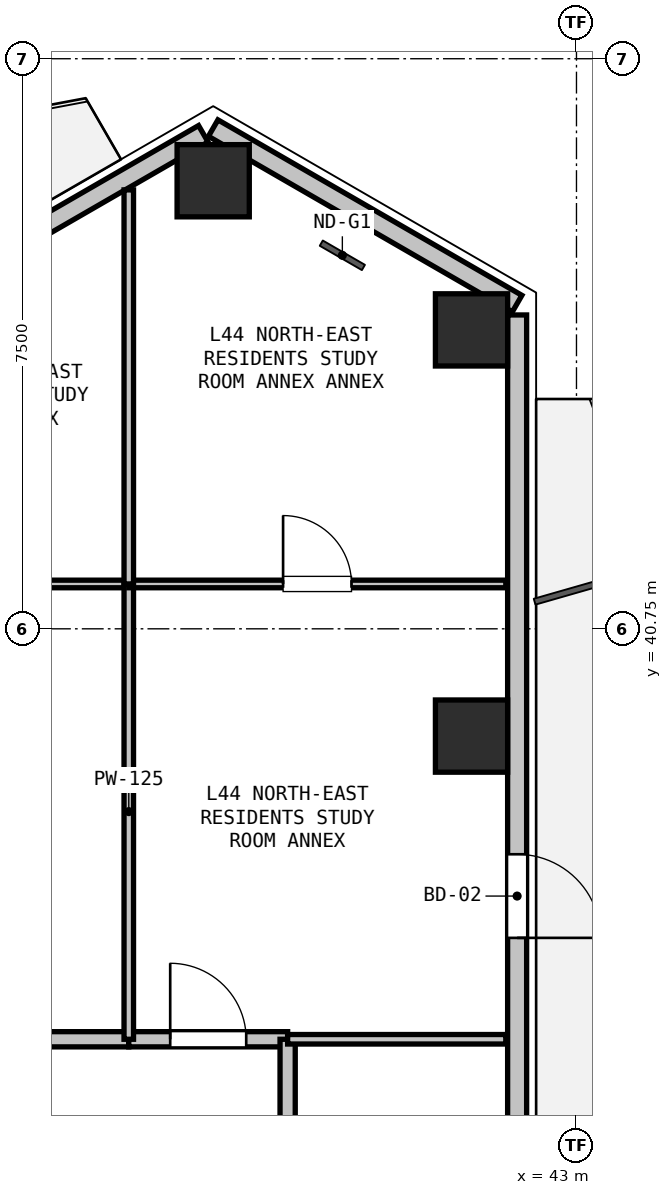
"""IFC4 building model, lengths in metres.
Left out: names, types, materials, properties, quantities, classifications, styles, units other than length and angle.
Written with IfcOpenShell. Run it as: python <this file> out.ifc"""

import sys

from ifc_helpers import new_model, si_unit, direction, frame, frame_2d, origin, origin_2d, place, context, subcontext, project, spatial, rectangle, hollow_rectangle, extrude, element, fill, save


model = new_model("IFC4")
c1 = context("Model", 3, precision=1e-05, world=origin(), true_north=direction((0.0, 1.0)))
c2 = subcontext(c1, "Body", "Model", "MODEL_VIEW")
j1 = project(units=[si_unit("LENGTHUNIT", "METRE"), si_unit("PLANEANGLEUNIT", "RADIAN")], contexts=[c1])
p1 = place(None, origin())
s1 = spatial("IfcSite", under=j1, at=p1, CompositionType="ELEMENT")
p2 = place(p1, origin())
s2 = spatial("IfcBuilding", under=s1, at=p2, CompositionType="ELEMENT")
p3 = place(p2, frame((0.0, 0.0, 157.5)))
s3 = spatial("IfcBuildingStorey", under=s2, at=p3, CompositionType="ELEMENT", Elevation=157.5)
for number, where, z_axis, x_axis in (
    (1, (38.22, 46.645, 0.0), (0.0, 0.0, 1.0), (1.0, 0.0, 0.0)),
    (2, (41.619, 44.683, 0.0), (0.0, 0.0, 1.0), (1.0, 0.0, 0.0)),
    (3, (41.619, 39.339, 0.0), (0.0, 0.0, 1.0), (1.0, 0.0, 0.0)),
):
    element("IfcColumn", number, at=place(p3, frame(where, z_axis=z_axis, x_axis=x_axis)), inside=s3, PredefinedType="COLUMN", context=c2, shape_type="SweptSolid", body=[
        extrude(hollow_rectangle(XDim=0.95, YDim=0.95, WallThickness=0.028, at=origin_2d()), origin(), (0.0, 0.0, 1.0), 3.3),
    ])
p4 = place(p3, frame((38.22, 47.338, 0.0), z_axis=(0.0, 0.0, 1.0), x_axis=(0.866035021055, -0.499983342029, 0.0)))
e4 = element("IfcWall", 4, at=p4, inside=s3, PredefinedType="SOLIDWALL", context=c2, shape_type="SweptSolid", body=[
    extrude(rectangle(XDim=4.617, YDim=0.25, at=frame_2d((2.309, 0.0))), origin(), (0.0, 0.0, 1.0), 2.6),
])
p5 = place(p3, frame((28.403, 41.67, 0.0), z_axis=(0.0, 0.0, 1.0), x_axis=(0.86602239209, 0.500005216371, 0.0)))
e5 = element("IfcWall", 5, at=p5, inside=s3, PredefinedType="SOLIDWALL", context=c2, shape_type="SweptSolid", body=[
    extrude(rectangle(XDim=11.186, YDim=0.25, at=frame_2d((5.593, 0.0))), origin(), (0.0, 0.0, 1.0), 2.6),
])
p6 = place(p5, frame((1.416, 0.0, 0.9)))
e6 = element("IfcOpeningElement", 6, at=p6, cuts=e5, PredefinedType="OPENING", context=c2, shape_type="SweptSolid", body=[
    extrude(rectangle(XDim=1.2, YDim=1.4, at=frame_2d((0.6, 0.7))), frame((0.0, 0.135, 0.0), z_axis=(0.0, -1.0, 0.0), x_axis=(1.0, 0.0, 0.0)), (0.0, 0.0, 1.0), 0.27),
])
p7 = place(p3, frame((42.219, 44.879, 0.0), z_axis=(0.0, 0.0, 1.0), x_axis=(0.0, -1.0, 0.0)))
e7 = element("IfcWall", 7, at=p7, inside=s3, PredefinedType="SOLIDWALL", context=c2, shape_type="SweptSolid", body=[
    extrude(rectangle(XDim=11.186, YDim=0.25, at=frame_2d((5.593, 0.0))), origin(), (0.0, 0.0, 1.0), 2.6),
])
p8 = place(p7, frame((7.095, 0.0, 0.0)))
e8 = element("IfcOpeningElement", 8, at=p8, cuts=e7, PredefinedType="OPENING", context=c2, shape_type="SweptSolid", body=[
    extrude(rectangle(XDim=1.1, YDim=2.1, at=frame_2d((0.55, 1.05))), frame((0.0, 0.135, 0.0), z_axis=(0.0, -1.0, 0.0), x_axis=(1.0, 0.0, 0.0)), (0.0, 0.0, 1.0), 0.27),
])
p9 = place(p3, frame((32.0, 35.35, 0.0), z_axis=(0.0, 0.0, 1.0), x_axis=(1.0, 0.0, 0.0)))
e9 = element("IfcWall", 9, at=p9, inside=s3, PredefinedType="PARTITIONING", context=c2, shape_type="SweptSolid", body=[
    extrude(rectangle(XDim=5.11, YDim=0.2, at=frame_2d((2.555, 0.0))), origin(), (0.0, 0.0, 1.0), 2.428),
])
p10 = place(p9, frame((2.055, 0.0, 0.0)))
e10 = element("IfcOpeningElement", 10, at=p10, cuts=e9, PredefinedType="OPENING", context=c2, shape_type="SweptSolid", body=[
    extrude(rectangle(XDim=1.0, YDim=2.15, at=frame_2d((0.5, 1.075))), frame((0.0, 0.11, 0.0), z_axis=(0.0, -1.0, 0.0), x_axis=(1.0, 0.0, 0.0)), (0.0, 0.0, 1.0), 0.22),
])
p11 = place(p3, frame((37.11, 35.35, 0.0), z_axis=(0.0, 0.0, 1.0), x_axis=(1.0, 0.0, 0.0)))
e11 = element("IfcWall", 11, at=p11, inside=s3, PredefinedType="PARTITIONING", context=c2, shape_type="SweptSolid", body=[
    extrude(rectangle(XDim=2.09, YDim=0.2, at=frame_2d((1.045, 0.0))), origin(), (0.0, 0.0, 1.0), 2.428),
])
p12 = place(p11, frame((0.545, 0.0, 0.0)))
e12 = element("IfcOpeningElement", 12, at=p12, cuts=e11, PredefinedType="OPENING", context=c2, shape_type="SweptSolid", body=[
    extrude(rectangle(XDim=1.0, YDim=2.15, at=frame_2d((0.5, 1.075))), frame((0.0, 0.11, 0.0), z_axis=(0.0, -1.0, 0.0), x_axis=(1.0, 0.0, 0.0)), (0.0, 0.0, 1.0), 0.22),
])
p13 = place(p3, frame((39.2, 35.35, 0.0), z_axis=(0.0, 0.0, 1.0), x_axis=(0.0, -1.0, 0.0)))
e13 = element("IfcWall", 13, at=p13, inside=s3, PredefinedType="PARTITIONING", context=c2, shape_type="SweptSolid", body=[
    extrude(rectangle(XDim=1.75, YDim=0.2, at=frame_2d((0.875, 0.0))), origin(), (0.0, 0.0, 1.0), 2.98),
])
p14 = place(p3, frame((32.0, 41.34, 0.0), z_axis=(0.0, 0.0, 1.0), x_axis=(1.0, 0.0, 0.0)))
e14 = element("IfcWall", 14, at=p14, inside=s3, PredefinedType="PARTITIONING", context=c2, shape_type="SweptSolid", body=[
    extrude(rectangle(XDim=5.11, YDim=0.1, at=frame_2d((2.555, 0.0))), origin(), (0.0, 0.0, 1.0), 2.98),
])
p15 = place(p14, frame((2.105, 0.0, 0.0)))
e15 = element("IfcOpeningElement", 15, at=p15, cuts=e14, PredefinedType="OPENING", context=c2, shape_type="SweptSolid", body=[
    extrude(rectangle(XDim=0.9, YDim=2.1, at=frame_2d((0.45, 1.05))), frame((0.0, 0.06, 0.0), z_axis=(0.0, -1.0, 0.0), x_axis=(1.0, 0.0, 0.0)), (0.0, 0.0, 1.0), 0.12),
])
p16 = place(p3, frame((37.11, 41.34, 0.0), z_axis=(0.0, 0.0, 1.0), x_axis=(0.0, -1.0, 0.0)))
e16 = element("IfcWall", 16, at=p16, inside=s3, PredefinedType="PARTITIONING", context=c2, shape_type="SweptSolid", body=[
    extrude(rectangle(XDim=5.99, YDim=0.125, at=frame_2d((2.995, 0.0))), origin(), (0.0, 0.0, 1.0), 2.428),
])
p17 = place(p3, frame((37.11, 41.34, 0.0), z_axis=(0.0, 0.0, 1.0), x_axis=(1.0, 0.0, 0.0)))
e17 = element("IfcWall", 17, at=p17, inside=s3, PredefinedType="PARTITIONING", context=c2, shape_type="SweptSolid", body=[
    extrude(rectangle(XDim=4.96, YDim=0.1, at=frame_2d((2.48, 0.0))), origin(), (0.0, 0.0, 1.0), 2.428),
])
p18 = place(p17, frame((2.03, 0.0, 0.0)))
e18 = element("IfcOpeningElement", 18, at=p18, cuts=e17, PredefinedType="OPENING", context=c2, shape_type="SweptSolid", body=[
    extrude(rectangle(XDim=0.9, YDim=2.1, at=frame_2d((0.45, 1.05))), frame((0.0, 0.06, 0.0), z_axis=(0.0, -1.0, 0.0), x_axis=(1.0, 0.0, 0.0)), (0.0, 0.0, 1.0), 0.12),
])
p19 = place(p3, frame((42.07, 35.35, 0.0), z_axis=(0.0, 0.0, 1.0), x_axis=(-1.0, 0.0, 0.0)))
e19 = element("IfcWall", 19, at=p19, inside=s3, PredefinedType="PARTITIONING", context=c2, shape_type="SweptSolid", body=[
    extrude(rectangle(XDim=2.87, YDim=0.125, at=frame_2d((1.435, 0.0))), origin(), (0.0, 0.0, 1.0), 2.365),
])
p20 = place(p3, frame((37.11, 46.524, 0.0), z_axis=(0.0, 0.0, 1.0), x_axis=(0.0, -1.0, 0.0)))
e20 = element("IfcWall", 20, at=p20, inside=s3, PredefinedType="PARTITIONING", context=c2, shape_type="SweptSolid", body=[
    extrude(rectangle(XDim=5.184, YDim=0.125, at=frame_2d((2.592, 0.0))), origin(), (0.0, 0.0, 1.0), 2.645),
])
p21 = place(p8, origin())
e21 = element("IfcDoor", 21, at=p21, inside=s3, OperationType="SINGLE_SWING_RIGHT", PredefinedType="DOOR", context=c2, shape_type="SweptSolid", body=[
    extrude(rectangle(XDim=1.1, YDim=2.1, at=frame_2d((0.55, 1.05))), frame((0.0, 0.025, 0.0), z_axis=(0.0, -1.0, 0.0), x_axis=(1.0, 0.0, 0.0)), (0.0, 0.0, 1.0), 0.05),
])
fill(e8, e21)
p22 = place(p12, origin())
e22 = element("IfcDoor", 22, at=p22, inside=s3, OperationType="SINGLE_SWING_LEFT", PredefinedType="DOOR", context=c2, shape_type="SweptSolid", body=[
    extrude(rectangle(XDim=1.0, YDim=2.15, at=frame_2d((0.5, 1.075))), frame((0.0, 0.025, 0.0), z_axis=(0.0, -1.0, 0.0), x_axis=(1.0, 0.0, 0.0)), (0.0, 0.0, 1.0), 0.05),
])
fill(e12, e22)
p23 = place(p18, origin())
e23 = element("IfcDoor", 23, at=p23, inside=s3, OperationType="SINGLE_SWING_LEFT", PredefinedType="DOOR", context=c2, shape_type="SweptSolid", body=[
    extrude(rectangle(XDim=0.9, YDim=2.1, at=frame_2d((0.45, 1.05))), frame((0.0, 0.025, 0.0), z_axis=(0.0, -1.0, 0.0), x_axis=(1.0, 0.0, 0.0)), (0.0, 0.0, 1.0), 0.05),
])
fill(e18, e23)
save(model, sys.argv[1])
